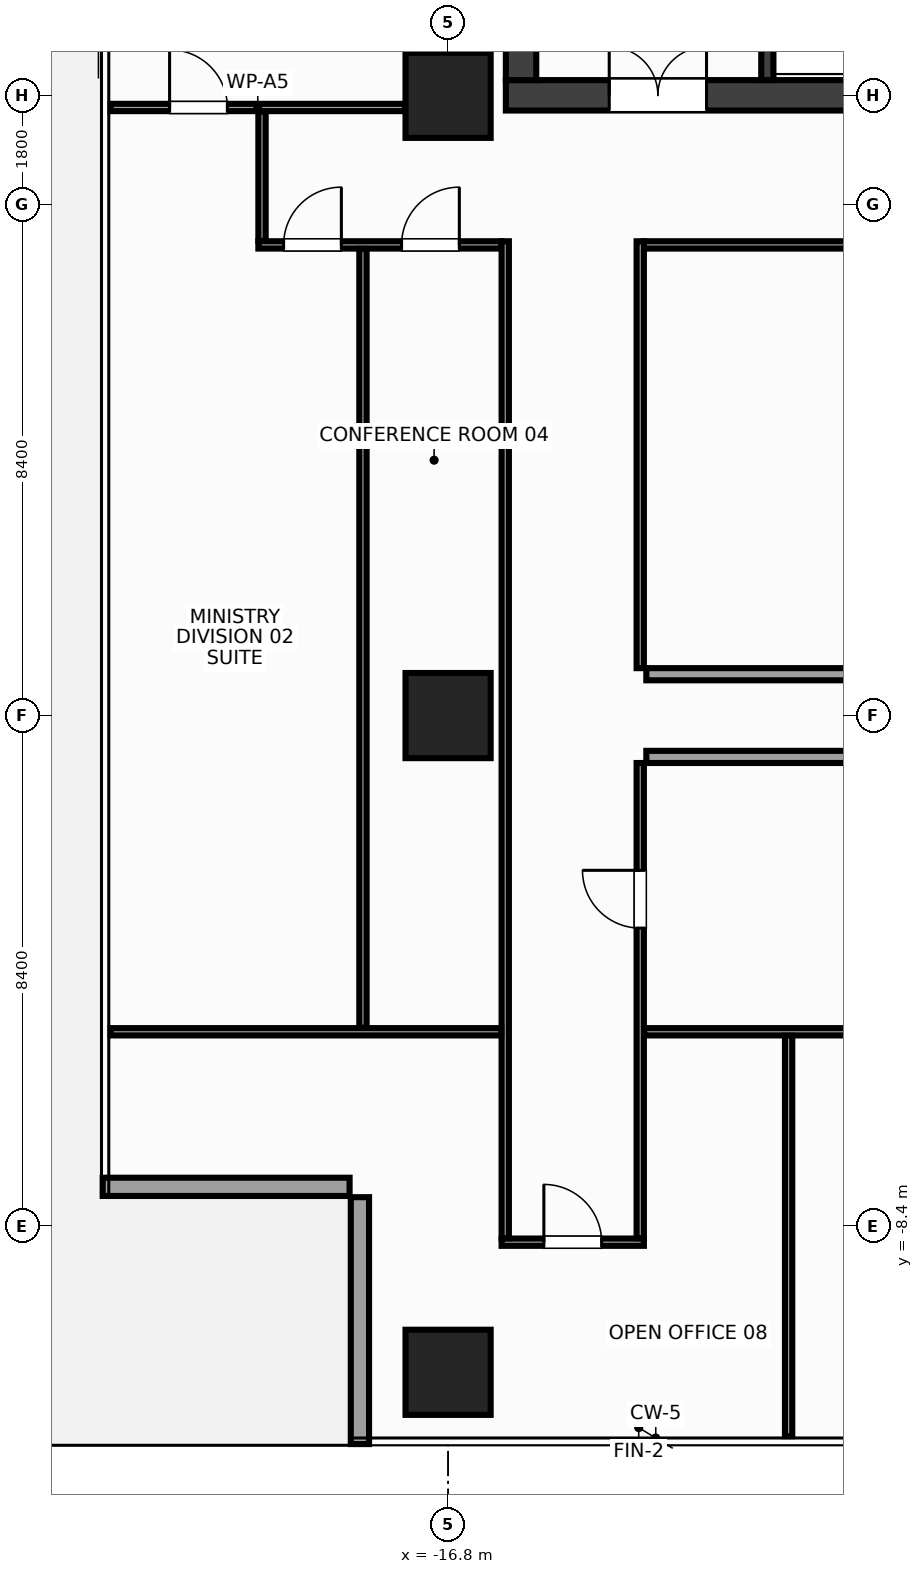
"""IFC4 building model, lengths in metres.
Left out: names, types, materials, properties, quantities, classifications, styles, units other than length and angle.
Written with IfcOpenShell. Run it as: python <this file> out.ifc"""

import sys

from ifc_helpers import new_model, si_unit, direction, frame, frame_2d, origin, origin_2d, place, context, subcontext, project, spatial, rectangle, extrude, source, transform, mapped, element, fill, save


model = new_model("IFC4")
c1 = context("Model", 3, precision=1e-05, world=origin(), true_north=direction((0.0, 1.0)))
c2 = subcontext(c1, "Body", "Model", "MODEL_VIEW")
j1 = project(units=[si_unit("LENGTHUNIT", "METRE"), si_unit("PLANEANGLEUNIT", "RADIAN")], contexts=[c1])
p1 = place(None, origin())
s1 = spatial("IfcSite", under=j1, at=p1, CompositionType="ELEMENT")
p2 = place(p1, origin())
s2 = spatial("IfcBuilding", under=s1, at=p2, CompositionType="ELEMENT")
p3 = place(p2, frame((0.0, 0.0, 228.8)))
s3 = spatial("IfcBuildingStorey", under=s2, at=p3, CompositionType="ELEMENT", Elevation=228.8)
m1 = source(origin(), c2, "Body", "SweptSolid", [
    extrude(rectangle(XDim=31.7, YDim=0.5, at=frame_2d((15.85, 0.0))), origin(), (0.0, 0.0, 1.0), 3.6),
])
p4 = place(p3, frame((-15.85, 10.2, 0.0), z_axis=(0.0, 0.0, 1.0), x_axis=(1.0, 0.0, 0.0)))
e1 = element("IfcWall", 1, at=p4, inside=s3, PredefinedType="SHEAR", context=c2, shape_type="MappedRepresentation", body=[
    mapped(m1, transform((0.0, 0.0, 0.0), x_axis=(1.0, 0.0, 0.0), y_axis=(0.0, 1.0, 0.0), z_axis=(0.0, 0.0, 1.0), scale=1.0)),
])
p5 = place(p4, frame((1.7, 0.0, 0.0)))
e2 = element("IfcOpeningElement", 2, at=p5, cuts=e1, PredefinedType="OPENING", context=c2, shape_type="SweptSolid", body=[
    extrude(rectangle(XDim=1.6, YDim=2.15, at=frame_2d((0.8, 1.075))), frame((0.0, 0.262, 0.0), z_axis=(0.0, -1.0, 0.0), x_axis=(1.0, 0.0, 0.0)), (0.0, 0.0, 1.0), 0.524),
])
p6 = place(p4, frame((28.4, 0.0, 0.0)))
e3 = element("IfcOpeningElement", 3, at=p6, cuts=e1, PredefinedType="OPENING", context=c2, shape_type="SweptSolid", body=[
    extrude(rectangle(XDim=1.6, YDim=2.15, at=frame_2d((0.8, 1.075))), frame((0.0, 0.262, 0.0), z_axis=(0.0, -1.0, 0.0), x_axis=(1.0, 0.0, 0.0)), (0.0, 0.0, 1.0), 0.524),
])
p7 = place(p4, frame((15.1, 0.0, 0.0)))
e4 = element("IfcOpeningElement", 4, at=p7, cuts=e1, PredefinedType="OPENING", context=c2, shape_type="SweptSolid", body=[
    extrude(rectangle(XDim=1.5, YDim=2.2, at=frame_2d((0.75, 1.1))), frame((0.0, 0.262, 0.0), z_axis=(0.0, -1.0, 0.0), x_axis=(1.0, 0.0, 0.0)), (0.0, 0.0, 1.0), 0.524),
])
m2 = source(origin(), c2, "Body", "SweptSolid", [
    extrude(rectangle(XDim=13.1, YDim=0.5, at=frame_2d((6.55, 0.0))), origin(), (0.0, 0.0, 1.0), 3.6),
])
p8 = place(p3, frame((-15.6, 10.45, 0.0), z_axis=(0.0, 0.0, 1.0), x_axis=(0.0, 1.0, 0.0)))
e5 = element("IfcWall", 5, at=p8, inside=s3, PredefinedType="SHEAR", context=c2, shape_type="MappedRepresentation", body=[
    mapped(m2, transform((0.0, 0.0, 0.0), x_axis=(1.0, 0.0, 0.0), y_axis=(0.0, 1.0, 0.0), z_axis=(0.0, 0.0, 1.0), scale=1.0)),
])
m3 = source(origin(), c2, "Body", "SweptSolid", [
    extrude(rectangle(XDim=3.2, YDim=0.2, at=frame_2d((1.6, 0.0))), origin(), (0.0, 0.0, 1.0), 3.6),
])
p9 = place(p3, frame((-11.55, 10.45, 0.0), z_axis=(0.0, 0.0, 1.0), x_axis=(0.0, 1.0, 0.0)))
e6 = element("IfcWall", 6, at=p9, inside=s3, PredefinedType="SHEAR", context=c2, shape_type="MappedRepresentation", body=[
    mapped(m3, transform((0.0, 0.0, 0.0), x_axis=(1.0, 0.0, 0.0), y_axis=(0.0, 1.0, 0.0), z_axis=(0.0, 0.0, 1.0), scale=1.0)),
])
p10 = place(p9, frame((0.9, 0.0, 0.0)))
e7 = element("IfcOpeningElement", 7, at=p10, cuts=e6, PredefinedType="OPENING", context=c2, shape_type="SweptSolid", body=[
    extrude(rectangle(XDim=1.1, YDim=2.15, at=frame_2d((0.55, 1.075))), frame((0.0, 0.112, 0.0), z_axis=(0.0, -1.0, 0.0), x_axis=(1.0, 0.0, 0.0)), (0.0, 0.0, 1.0), 0.224),
])
m4 = source(origin(), c2, "Body", "SweptSolid", [
    extrude(rectangle(XDim=1.4, YDim=1.4, at=origin_2d()), origin(), (0.0, 0.0, 1.0), 3.6),
])
for number, where, z_axis, x_axis in (
    (8, (-16.8, -10.8, 0.0), (0.0, 0.0, 1.0), (1.0, 0.0, 0.0)),
    (9, (-16.8, 0.0, 0.0), (0.0, 0.0, 1.0), (1.0, 0.0, 0.0)),
    (10, (-16.8, 10.2, 0.0), (0.0, 0.0, 1.0), (1.0, 0.0, 0.0)),
):
    element("IfcColumn", number, at=place(p3, frame(where, z_axis=z_axis, x_axis=x_axis)), inside=s3, PredefinedType="COLUMN", context=c2, shape_type="MappedRepresentation", body=[
        mapped(m4, transform((0.0, 0.0, 0.0), x_axis=(1.0, 0.0, 0.0), y_axis=(0.0, 1.0, 0.0), z_axis=(0.0, 0.0, 1.0), scale=1.0)),
    ])
m5 = source(origin(), c2, "Body", "SweptSolid", [
    extrude(rectangle(XDim=4.06, YDim=0.3, at=frame_2d((2.03, 0.0))), origin(), (0.0, 0.0, 1.0), 2.75),
])
for number, where, z_axis, x_axis in (
    (11, (-22.48, -7.75, 0.0), (0.0, 0.0, 1.0), (1.0, 0.0, 0.0)),
    (12, (-18.25, -7.92, 0.0), (0.0, 0.0, 1.0), (0.0, -1.0, 0.0)),
):
    element("IfcWall", number, at=place(p3, frame(where, z_axis=z_axis, x_axis=x_axis)), inside=s3, PredefinedType="STANDARD", context=c2, shape_type="MappedRepresentation", body=[
        mapped(m5, transform((0.0, 0.0, 0.0), x_axis=(1.0, 0.0, 0.0), y_axis=(0.0, 1.0, 0.0), z_axis=(0.0, 0.0, 1.0), scale=1.0)),
    ])
m6 = source(origin(), c2, "Body", "SweptSolid", [
    extrude(rectangle(XDim=4.52, YDim=0.2, at=frame_2d((2.26, 0.0))), origin(), (0.0, 0.0, 1.0), 3.37),
])
for number, where, z_axis, x_axis in (
    (13, (-13.54, 0.68, 0.0), (0.0, 0.0, 1.0), (1.0, 0.0, 0.0)),
    (14, (-13.54, -0.68, 0.0), (0.0, 0.0, 1.0), (1.0, 0.0, 0.0)),
):
    element("IfcWall", number, at=place(p3, frame(where, z_axis=z_axis, x_axis=x_axis)), inside=s3, PredefinedType="PARTITIONING", context=c2, shape_type="MappedRepresentation", body=[
        mapped(m6, transform((0.0, 0.0, 0.0), x_axis=(1.0, 0.0, 0.0), y_axis=(0.0, 1.0, 0.0), z_axis=(0.0, 0.0, 1.0), scale=1.0)),
    ])
m7 = source(origin(), c2, "Body", "SweptSolid", [
    extrude(rectangle(XDim=4.84, YDim=0.12, at=frame_2d((2.42, 0.0))), origin(), (0.0, 0.0, 1.0), 3.37),
])
p11 = place(p3, frame((-22.35, 10.0, 0.0), z_axis=(0.0, 0.0, 1.0), x_axis=(1.0, 0.0, 0.0)))
e15 = element("IfcWall", 15, at=p11, inside=s3, PredefinedType="PARTITIONING", context=c2, shape_type="MappedRepresentation", body=[
    mapped(m7, transform((0.0, 0.0, 0.0), x_axis=(1.0, 0.0, 0.0), y_axis=(0.0, 1.0, 0.0), z_axis=(0.0, 0.0, 1.0), scale=1.0)),
])
p12 = place(p11, frame((0.97, 0.0, 0.0)))
e16 = element("IfcOpeningElement", 16, at=p12, cuts=e15, PredefinedType="OPENING", context=c2, shape_type="SweptSolid", body=[
    extrude(rectangle(XDim=0.95, YDim=2.15, at=frame_2d((0.475, 1.075))), frame((0.0, 0.072, 0.0), z_axis=(0.0, -1.0, 0.0), x_axis=(1.0, 0.0, 0.0)), (0.0, 0.0, 1.0), 0.144),
])
m8 = source(origin(), c2, "Body", "SweptSolid", [
    extrude(rectangle(XDim=4.0, YDim=0.12, at=frame_2d((2.0, 0.0))), origin(), (0.0, 0.0, 1.0), 2.755),
])
p13 = place(p3, frame((-19.92, 7.74, 0.0), z_axis=(0.0, 0.0, 1.0), x_axis=(1.0, 0.0, 0.0)))
e17 = element("IfcWall", 17, at=p13, inside=s3, PredefinedType="PARTITIONING", context=c2, shape_type="MappedRepresentation", body=[
    mapped(m8, transform((0.0, 0.0, 0.0), x_axis=(1.0, 0.0, 0.0), y_axis=(0.0, 1.0, 0.0), z_axis=(0.0, 0.0, 1.0), scale=1.0)),
])
p14 = place(p13, frame((0.415, 0.0, 0.0)))
e18 = element("IfcOpeningElement", 18, at=p14, cuts=e17, PredefinedType="OPENING", context=c2, shape_type="SweptSolid", body=[
    extrude(rectangle(XDim=0.95, YDim=2.15, at=frame_2d((0.475, 1.075))), frame((0.0, 0.072, 0.0), z_axis=(0.0, -1.0, 0.0), x_axis=(1.0, 0.0, 0.0)), (0.0, 0.0, 1.0), 0.144),
])
p15 = place(p13, frame((2.355, 0.0, 0.0)))
e19 = element("IfcOpeningElement", 19, at=p15, cuts=e17, PredefinedType="OPENING", context=c2, shape_type="SweptSolid", body=[
    extrude(rectangle(XDim=0.95, YDim=2.15, at=frame_2d((0.475, 1.075))), frame((0.0, 0.072, 0.0), z_axis=(0.0, -1.0, 0.0), x_axis=(1.0, 0.0, 0.0)), (0.0, 0.0, 1.0), 0.144),
])
m9 = source(origin(), c2, "Body", "SweptSolid", [
    extrude(rectangle(XDim=27.16, YDim=0.12, at=frame_2d((13.58, 0.0))), origin(), (0.0, 0.0, 1.0), 3.37),
])
p16 = place(p3, frame((-13.58, 7.74, 0.0), z_axis=(0.0, 0.0, 1.0), x_axis=(1.0, 0.0, 0.0)))
e20 = element("IfcWall", 20, at=p16, inside=s3, PredefinedType="PARTITIONING", context=c2, shape_type="MappedRepresentation", body=[
    mapped(m9, transform((0.0, 0.0, 0.0), x_axis=(1.0, 0.0, 0.0), y_axis=(0.0, 1.0, 0.0), z_axis=(0.0, 0.0, 1.0), scale=1.0)),
])
p17 = place(p16, frame((13.105, 0.0, 0.0)))
e21 = element("IfcOpeningElement", 21, at=p17, cuts=e20, PredefinedType="OPENING", context=c2, shape_type="SweptSolid", body=[
    extrude(rectangle(XDim=0.95, YDim=2.15, at=frame_2d((0.475, 1.075))), frame((0.0, 0.072, 0.0), z_axis=(0.0, -1.0, 0.0), x_axis=(1.0, 0.0, 0.0)), (0.0, 0.0, 1.0), 0.144),
])
m10 = source(origin(), c2, "Body", "SweptSolid", [
    extrude(rectangle(XDim=2.34, YDim=0.12, at=frame_2d((1.17, 0.0))), origin(), (0.0, 0.0, 1.0), 3.37),
])
p18 = place(p3, frame((-15.92, -8.66, 0.0), z_axis=(0.0, 0.0, 1.0), x_axis=(1.0, 0.0, 0.0)))
e22 = element("IfcWall", 22, at=p18, inside=s3, PredefinedType="PARTITIONING", context=c2, shape_type="MappedRepresentation", body=[
    mapped(m10, transform((0.0, 0.0, 0.0), x_axis=(1.0, 0.0, 0.0), y_axis=(0.0, 1.0, 0.0), z_axis=(0.0, 0.0, 1.0), scale=1.0)),
])
p19 = place(p18, frame((0.695, 0.0, 0.0)))
e23 = element("IfcOpeningElement", 23, at=p19, cuts=e22, PredefinedType="OPENING", context=c2, shape_type="SweptSolid", body=[
    extrude(rectangle(XDim=0.95, YDim=2.15, at=frame_2d((0.475, 1.075))), frame((0.0, 0.072, 0.0), z_axis=(0.0, -1.0, 0.0), x_axis=(1.0, 0.0, 0.0)), (0.0, 0.0, 1.0), 0.144),
])
m11 = source(origin(), c2, "Body", "SweptSolid", [
    extrude(rectangle(XDim=2.13, YDim=0.12, at=frame_2d((1.065, 0.0))), origin(), (0.0, 0.0, 1.0), 3.37),
])
p20 = place(p3, frame((-19.86, 7.805, 0.0), z_axis=(0.0, 0.0, 1.0), x_axis=(0.0, 1.0, 0.0)))
e24 = element("IfcWall", 24, at=p20, inside=s3, PredefinedType="PARTITIONING", context=c2, shape_type="MappedRepresentation", body=[
    mapped(m11, transform((0.0, 0.0, 0.0), x_axis=(1.0, 0.0, 0.0), y_axis=(0.0, 1.0, 0.0), z_axis=(0.0, 0.0, 1.0), scale=1.0)),
])
m12 = source(origin(), c2, "Body", "SweptSolid", [
    extrude(rectangle(XDim=16.395, YDim=0.12, at=frame_2d((8.198, 0.0))), origin(), (0.0, 0.0, 1.0), 2.655),
])
p21 = place(p3, frame((-15.86, -8.595, 0.0), z_axis=(0.0, 0.0, 1.0), x_axis=(0.0, 1.0, 0.0)))
e25 = element("IfcWall", 25, at=p21, inside=s3, PredefinedType="PARTITIONING", context=c2, shape_type="MappedRepresentation", body=[
    mapped(m12, transform((0.0, 0.0, 0.0), x_axis=(1.0, 0.0, 0.0), y_axis=(0.0, 1.0, 0.0), z_axis=(0.0, 0.0, 1.0), scale=1.0)),
])
m13 = source(origin(), c2, "Body", "SweptSolid", [
    extrude(rectangle(XDim=7.815, YDim=0.12, at=frame_2d((3.907, 0.0))), origin(), (0.0, 0.0, 1.0), 3.37),
])
p22 = place(p3, frame((-13.64, -8.595, 0.0), z_axis=(0.0, 0.0, 1.0), x_axis=(0.0, 1.0, 0.0)))
e26 = element("IfcWall", 26, at=p22, inside=s3, PredefinedType="PARTITIONING", context=c2, shape_type="MappedRepresentation", body=[
    mapped(m13, transform((0.0, 0.0, 0.0), x_axis=(1.0, 0.0, 0.0), y_axis=(0.0, 1.0, 0.0), z_axis=(0.0, 0.0, 1.0), scale=1.0)),
])
p23 = place(p22, frame((5.1, 0.0, 0.0)))
e27 = element("IfcOpeningElement", 27, at=p23, cuts=e26, PredefinedType="OPENING", context=c2, shape_type="SweptSolid", body=[
    extrude(rectangle(XDim=0.95, YDim=2.15, at=frame_2d((0.475, 1.075))), frame((0.0, 0.072, 0.0), z_axis=(0.0, -1.0, 0.0), x_axis=(1.0, 0.0, 0.0)), (0.0, 0.0, 1.0), 0.144),
])
m14 = source(origin(), c2, "Body", "SweptSolid", [
    extrude(rectangle(XDim=7.02, YDim=0.12, at=frame_2d((3.51, 0.0))), origin(), (0.0, 0.0, 1.0), 2.655),
])
p24 = place(p3, frame((-13.64, 0.78, 0.0), z_axis=(0.0, 0.0, 1.0), x_axis=(0.0, 1.0, 0.0)))
e28 = element("IfcWall", 28, at=p24, inside=s3, PredefinedType="PARTITIONING", context=c2, shape_type="MappedRepresentation", body=[
    mapped(m14, transform((0.0, 0.0, 0.0), x_axis=(1.0, 0.0, 0.0), y_axis=(0.0, 1.0, 0.0), z_axis=(0.0, 0.0, 1.0), scale=1.0)),
])
m15 = source(origin(), c2, "Body", "SweptSolid", [
    extrude(rectangle(XDim=6.425, YDim=0.12, at=frame_2d((3.212, 0.0))), origin(), (0.0, 0.0, 1.0), 2.755),
])
p25 = place(p3, frame((-22.35, -5.2, 0.0), z_axis=(0.0, 0.0, 1.0), x_axis=(1.0, 0.0, 0.0)))
e29 = element("IfcWall", 29, at=p25, inside=s3, PredefinedType="PARTITIONING", context=c2, shape_type="MappedRepresentation", body=[
    mapped(m15, transform((0.0, 0.0, 0.0), x_axis=(1.0, 0.0, 0.0), y_axis=(0.0, 1.0, 0.0), z_axis=(0.0, 0.0, 1.0), scale=1.0)),
])
m16 = source(origin(), c2, "Body", "SweptSolid", [
    extrude(rectangle(XDim=27.15, YDim=0.12, at=frame_2d((13.575, 0.0))), origin(), (0.0, 0.0, 1.0), 2.755),
])
p26 = place(p3, frame((-13.575, -5.2, 0.0), z_axis=(0.0, 0.0, 1.0), x_axis=(1.0, 0.0, 0.0)))
e30 = element("IfcWall", 30, at=p26, inside=s3, PredefinedType="PARTITIONING", context=c2, shape_type="MappedRepresentation", body=[
    mapped(m16, transform((0.0, 0.0, 0.0), x_axis=(1.0, 0.0, 0.0), y_axis=(0.0, 1.0, 0.0), z_axis=(0.0, 0.0, 1.0), scale=1.0)),
])
p27 = place(p26, frame((13.1, 0.0, 0.0)))
e31 = element("IfcOpeningElement", 31, at=p27, cuts=e30, PredefinedType="OPENING", context=c2, shape_type="SweptSolid", body=[
    extrude(rectangle(XDim=0.95, YDim=2.15, at=frame_2d((0.475, 1.075))), frame((0.0, 0.072, 0.0), z_axis=(0.0, -1.0, 0.0), x_axis=(1.0, 0.0, 0.0)), (0.0, 0.0, 1.0), 0.144),
])
m17 = source(origin(), c2, "Body", "SweptSolid", [
    extrude(rectangle(XDim=12.81, YDim=0.12, at=frame_2d((6.405, 0.0))), origin(), (0.0, 0.0, 1.0), 3.37),
])
p28 = place(p3, frame((-18.2, -5.135, 0.0), z_axis=(0.0, 0.0, 1.0), x_axis=(0.0, 1.0, 0.0)))
e32 = element("IfcWall", 32, at=p28, inside=s3, PredefinedType="PARTITIONING", context=c2, shape_type="MappedRepresentation", body=[
    mapped(m17, transform((0.0, 0.0, 0.0), x_axis=(1.0, 0.0, 0.0), y_axis=(0.0, 1.0, 0.0), z_axis=(0.0, 0.0, 1.0), scale=1.0)),
])
m18 = source(origin(), c2, "Body", "SweptSolid", [
    extrude(rectangle(XDim=6.585, YDim=0.12, at=frame_2d((3.292, 0.0))), origin(), (0.0, 0.0, 1.0), 2.905),
])
p29 = place(p3, frame((-11.2, -11.85, 0.0), z_axis=(0.0, 0.0, 1.0), x_axis=(0.0, 1.0, 0.0)))
e33 = element("IfcWall", 33, at=p29, inside=s3, PredefinedType="PARTITIONING", context=c2, shape_type="MappedRepresentation", body=[
    mapped(m18, transform((0.0, 0.0, 0.0), x_axis=(1.0, 0.0, 0.0), y_axis=(0.0, 1.0, 0.0), z_axis=(0.0, 0.0, 1.0), scale=1.0)),
])
m19 = source(origin(), c2, "Body", "SweptSolid", [
    extrude(rectangle(XDim=1.6, YDim=2.15, at=frame_2d((0.8, 1.075))), frame((0.0, 0.025, 0.0), z_axis=(0.0, -1.0, 0.0), x_axis=(1.0, 0.0, 0.0)), (0.0, 0.0, 1.0), 0.05),
])
p30 = place(p5, origin())
e34 = element("IfcDoor", 34, at=p30, inside=s3, OperationType="DOUBLE_DOOR_SINGLE_SWING", PredefinedType="DOOR", context=c2, shape_type="MappedRepresentation", body=[
    mapped(m19, transform((0.0, 0.0, 0.0), x_axis=(1.0, 0.0, 0.0), y_axis=(0.0, 1.0, 0.0), z_axis=(0.0, 0.0, 1.0), scale=1.0)),
])
fill(e2, e34)
m20 = source(origin(), c2, "Body", "SweptSolid", [
    extrude(rectangle(XDim=0.95, YDim=2.15, at=frame_2d((0.475, 1.075))), frame((0.0, 0.025, 0.0), z_axis=(0.0, -1.0, 0.0), x_axis=(1.0, 0.0, 0.0)), (0.0, 0.0, 1.0), 0.05),
])
p31 = place(p14, origin())
e35 = element("IfcDoor", 35, at=p31, inside=s3, OperationType="SINGLE_SWING_RIGHT", PredefinedType="DOOR", context=c2, shape_type="MappedRepresentation", body=[
    mapped(m20, transform((0.0, 0.0, 0.0), x_axis=(1.0, 0.0, 0.0), y_axis=(0.0, 1.0, 0.0), z_axis=(0.0, 0.0, 1.0), scale=1.0)),
])
fill(e18, e35)
p32 = place(p15, origin())
e36 = element("IfcDoor", 36, at=p32, inside=s3, OperationType="SINGLE_SWING_RIGHT", PredefinedType="DOOR", context=c2, shape_type="MappedRepresentation", body=[
    mapped(m20, transform((0.0, 0.0, 0.0), x_axis=(1.0, 0.0, 0.0), y_axis=(0.0, 1.0, 0.0), z_axis=(0.0, 0.0, 1.0), scale=1.0)),
])
fill(e19, e36)
p33 = place(p23, origin())
e37 = element("IfcDoor", 37, at=p33, inside=s3, OperationType="SINGLE_SWING_RIGHT", PredefinedType="DOOR", context=c2, shape_type="MappedRepresentation", body=[
    mapped(m20, transform((0.0, 0.0, 0.0), x_axis=(1.0, 0.0, 0.0), y_axis=(0.0, 1.0, 0.0), z_axis=(0.0, 0.0, 1.0), scale=1.0)),
])
fill(e27, e37)
p34 = place(p19, origin())
e38 = element("IfcDoor", 38, at=p34, inside=s3, OperationType="SINGLE_SWING_LEFT", PredefinedType="DOOR", context=c2, shape_type="MappedRepresentation", body=[
    mapped(m20, transform((0.0, 0.0, 0.0), x_axis=(1.0, 0.0, 0.0), y_axis=(0.0, 1.0, 0.0), z_axis=(0.0, 0.0, 1.0), scale=1.0)),
])
fill(e23, e38)
p35 = place(p12, origin())
e39 = element("IfcDoor", 39, at=p35, inside=s3, OperationType="SINGLE_SWING_LEFT", PredefinedType="DOOR", context=c2, shape_type="MappedRepresentation", body=[
    mapped(m20, transform((0.0, 0.0, 0.0), x_axis=(1.0, 0.0, 0.0), y_axis=(0.0, 1.0, 0.0), z_axis=(0.0, 0.0, 1.0), scale=1.0)),
])
fill(e16, e39)
save(model, sys.argv[1])
